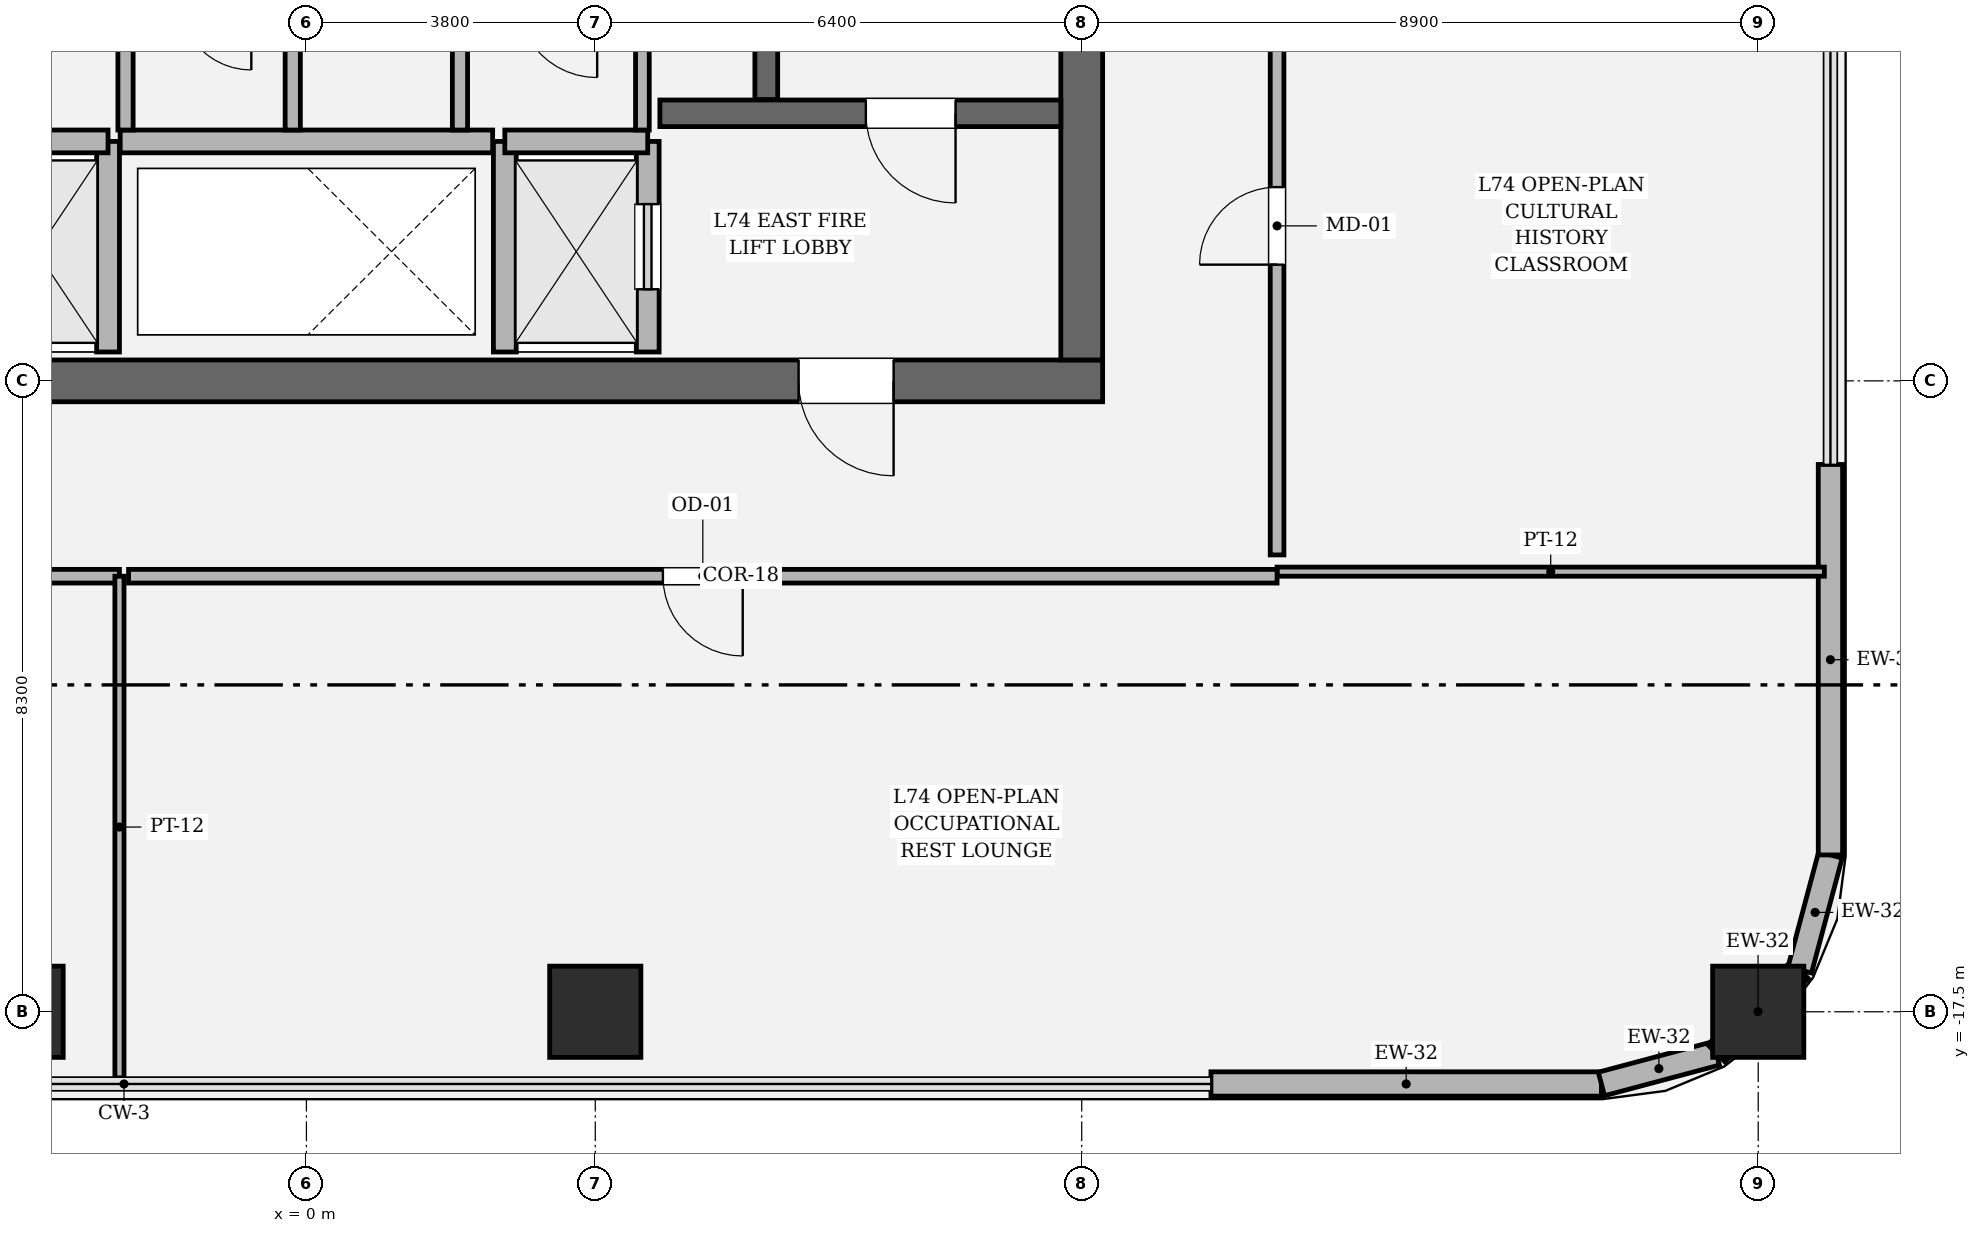
"""IFC4 building model, lengths in metres.
Left out: names, types, materials, properties, quantities, classifications, styles, units other than length and angle.
Written with IfcOpenShell. Run it as: python <this file> out.ifc"""

import sys

from ifc_helpers import new_model, si_unit, direction, frame, frame_2d, origin, origin_2d, place, context, subcontext, project, spatial, rectangle, hollow_rectangle, extrude, element, fill, save


model = new_model("IFC4")
c1 = context("Model", 3, precision=1e-05, world=origin(), true_north=direction((0.0, 1.0)))
c2 = subcontext(c1, "Body", "Model", "MODEL_VIEW")
j1 = project(units=[si_unit("LENGTHUNIT", "METRE"), si_unit("PLANEANGLEUNIT", "RADIAN")], contexts=[c1])
p1 = place(None, origin())
s1 = spatial("IfcSite", under=j1, at=p1, CompositionType="ELEMENT")
p2 = place(p1, origin())
s2 = spatial("IfcBuilding", under=s1, at=p2, CompositionType="ELEMENT")
p3 = place(p2, frame((0.0, 0.0, 313.2)))
s3 = spatial("IfcBuildingStorey", under=s2, at=p3, CompositionType="ELEMENT", Elevation=313.2)
p4 = place(p3, frame((10.475, -9.2, 0.0), z_axis=(0.0, 0.0, 1.0), x_axis=(-1.0, 0.0, 0.0)))
e1 = element("IfcWall", 1, at=p4, inside=s3, PredefinedType="SHEAR", context=c2, shape_type="SweptSolid", body=[
    extrude(rectangle(XDim=20.95, YDim=0.55, at=frame_2d((10.475, 0.0))), origin(), (0.0, 0.0, 1.0), 4.2),
])
p5 = place(p4, frame((2.75, 0.0, 0.0)))
e2 = element("IfcOpeningElement", 2, at=p5, cuts=e1, PredefinedType="OPENING", context=c2, shape_type="SweptSolid", body=[
    extrude(rectangle(XDim=1.25, YDim=2.25, at=frame_2d((0.625, 1.125))), frame((0.0, 0.285, 0.0), z_axis=(0.0, -1.0, 0.0), x_axis=(1.0, 0.0, 0.0)), (0.0, 0.0, 1.0), 0.57),
])
p6 = place(p4, frame((16.95, 0.0, 0.0)))
e3 = element("IfcOpeningElement", 3, at=p6, cuts=e1, PredefinedType="OPENING", context=c2, shape_type="SweptSolid", body=[
    extrude(rectangle(XDim=1.25, YDim=2.25, at=frame_2d((0.625, 1.125))), frame((0.0, 0.285, 0.0), z_axis=(0.0, -1.0, 0.0), x_axis=(1.0, 0.0, 0.0)), (0.0, 0.0, 1.0), 0.57),
])
p7 = place(p3, frame((10.2, 8.925, 0.0), z_axis=(0.0, 0.0, 1.0), x_axis=(0.0, -1.0, 0.0)))
e4 = element("IfcWall", 4, at=p7, inside=s3, PredefinedType="SHEAR", context=c2, shape_type="SweptSolid", body=[
    extrude(rectangle(XDim=17.85, YDim=0.55, at=frame_2d((8.925, 0.0))), origin(), (0.0, 0.0, 1.0), 4.2),
])
p8 = place(p7, frame((3.955, 0.0, 0.0)))
e5 = element("IfcOpeningElement", 5, at=p8, cuts=e4, PredefinedType="OPENING", context=c2, shape_type="SweptSolid", body=[
    extrude(rectangle(XDim=1.18, YDim=2.2, at=frame_2d((0.59, 1.1))), frame((0.0, 0.285, 0.0), z_axis=(0.0, -1.0, 0.0), x_axis=(1.0, 0.0, 0.0)), (0.0, 0.0, 1.0), 0.57),
])
p9 = place(p3, frame((6.05, 3.45, 0.0), z_axis=(0.0, 0.0, 1.0), x_axis=(0.0, -1.0, 0.0)))
e6 = element("IfcWall", 6, at=p9, inside=s3, PredefinedType="SOLIDWALL", context=c2, shape_type="SweptSolid", body=[
    extrude(rectangle(XDim=8.95, YDim=0.3, at=frame_2d((4.475, 0.0))), origin(), (0.0, 0.0, 1.0), 4.2),
])
p10 = place(p3, frame((4.65, -5.68, 0.0), z_axis=(0.0, 0.0, 1.0), x_axis=(1.0, 0.0, 0.0)))
e7 = element("IfcWall", 7, at=p10, inside=s3, PredefinedType="SOLIDWALL", context=c2, shape_type="SweptSolid", body=[
    extrude(rectangle(XDim=5.275, YDim=0.35, at=frame_2d((2.638, 0.0))), origin(), (0.0, 0.0, 1.0), 4.2),
])
p11 = place(p10, frame((2.71, 0.0, 0.0)))
e8 = element("IfcOpeningElement", 8, at=p11, cuts=e7, PredefinedType="OPENING", context=c2, shape_type="SweptSolid", body=[
    extrude(rectangle(XDim=1.18, YDim=2.2, at=frame_2d((0.59, 1.1))), frame((0.0, 0.185, 0.0), z_axis=(0.0, -1.0, 0.0), x_axis=(1.0, 0.0, 0.0)), (0.0, 0.0, 1.0), 0.37),
])
for number, where, z_axis, x_axis in (
    (9, (-3.8, -17.5, 0.0), (0.0, 0.0, 1.0), (1.0, 0.0, 0.0)),
    (10, (3.8, -17.5, 0.0), (0.0, 0.0, 1.0), (1.0, 0.0, 0.0)),
    (11, (19.1, -17.5, 0.0), (0.0, 0.0, 1.0), (1.0, 0.0, 0.0)),
):
    element("IfcColumn", number, at=place(p3, frame(where, z_axis=z_axis, x_axis=x_axis)), inside=s3, PredefinedType="COLUMN", context=c2, shape_type="SweptSolid", body=[
        extrude(hollow_rectangle(XDim=1.2, YDim=1.2, WallThickness=0.035, at=origin_2d()), origin(), (0.0, 0.0, 1.0), 4.2),
    ])
p12 = place(p3, frame((11.9, -18.45, 0.0), z_axis=(0.0, 0.0, 1.0), x_axis=(1.0, 0.0, 0.0)))
e12 = element("IfcWall", 12, at=p12, inside=s3, PredefinedType="SOLIDWALL", context=c2, shape_type="SweptSolid", body=[
    extrude(rectangle(XDim=5.137, YDim=0.32, at=frame_2d((2.568, 0.0))), origin(), (0.0, 0.0, 1.0), 3.92),
])
p13 = place(p3, frame((17.037, -18.45, 0.0), z_axis=(0.0, 0.0, 1.0), x_axis=(0.966224582397, 0.257701486942, 0.0)))
e13 = element("IfcWall", 13, at=p13, inside=s3, PredefinedType="SOLIDWALL", context=c2, shape_type="SweptSolid", body=[
    extrude(rectangle(XDim=1.565, YDim=0.32, at=frame_2d((0.783, 0.0))), origin(), (0.0, 0.0, 1.0), 3.92),
])
p14 = place(p3, frame((18.549, -18.047, 0.0), z_axis=(0.0, 0.0, 1.0), x_axis=(0.707106781187, 0.707106781187, 0.0)))
e14 = element("IfcWall", 14, at=p14, inside=s3, PredefinedType="SOLIDWALL", context=c2, shape_type="SweptSolid", body=[
    extrude(rectangle(XDim=1.552, YDim=0.32, at=frame_2d((0.776, 0.0))), origin(), (0.0, 0.0, 1.0), 2.594),
])
p15 = place(p3, frame((19.646, -16.949, 0.0), z_axis=(0.0, 0.0, 1.0), x_axis=(0.257847112249, 0.966185730957, 0.0)))
e15 = element("IfcWall", 15, at=p15, inside=s3, PredefinedType="SOLIDWALL", context=c2, shape_type="SweptSolid", body=[
    extrude(rectangle(XDim=1.565, YDim=0.32, at=frame_2d((0.783, 0.0))), origin(), (0.0, 0.0, 1.0), 3.92),
])
p16 = place(p3, frame((20.05, -15.437, 0.0), z_axis=(0.0, 0.0, 1.0), x_axis=(0.0, 1.0, 0.0)))
e16 = element("IfcWall", 16, at=p16, inside=s3, PredefinedType="SOLIDWALL", context=c2, shape_type="SweptSolid", body=[
    extrude(rectangle(XDim=5.137, YDim=0.32, at=frame_2d((2.568, 0.0))), origin(), (0.0, 0.0, 1.0), 3.92),
])
p17 = place(p3, frame((-2.61, -8.82, 0.0), z_axis=(0.0, 0.0, 1.0), x_axis=(0.0, 1.0, 0.0)))
e17 = element("IfcWall", 17, at=p17, inside=s3, PredefinedType="SOLIDWALL", context=c2, shape_type="SweptSolid", body=[
    extrude(rectangle(XDim=2.77, YDim=0.3, at=frame_2d((1.385, 0.0))), origin(), (0.0, 0.0, 1.0), 3.92),
])
p18 = place(p3, frame((-4.49, -6.05, 0.0), z_axis=(0.0, 0.0, 1.0), x_axis=(1.0, 0.0, 0.0)))
e18 = element("IfcWall", 18, at=p18, inside=s3, PredefinedType="SOLIDWALL", context=c2, shape_type="SweptSolid", body=[
    extrude(rectangle(XDim=1.88, YDim=0.3, at=frame_2d((0.94, 0.0))), origin(), (0.0, 0.0, 1.0), 3.92),
])
p19 = place(p3, frame((4.49, -8.82, 0.0), z_axis=(0.0, 0.0, 1.0), x_axis=(0.0, 1.0, 0.0)))
e19 = element("IfcWall", 19, at=p19, inside=s3, PredefinedType="SOLIDWALL", context=c2, shape_type="SweptSolid", body=[
    extrude(rectangle(XDim=2.77, YDim=0.3, at=frame_2d((1.385, 0.0))), origin(), (0.0, 0.0, 1.0), 3.92),
])
p20 = place(p19, frame((0.825, 0.0, 0.0)))
e20 = element("IfcOpeningElement", 20, at=p20, cuts=e19, PredefinedType="OPENING", context=c2, shape_type="SweptSolid", body=[
    extrude(rectangle(XDim=1.12, YDim=2.25, at=frame_2d((0.56, 1.125))), frame((0.0, 0.16, 0.0), z_axis=(0.0, -1.0, 0.0), x_axis=(1.0, 0.0, 0.0)), (0.0, 0.0, 1.0), 0.32),
])
p21 = place(p3, frame((2.61, -8.82, 0.0), z_axis=(0.0, 0.0, 1.0), x_axis=(0.0, 1.0, 0.0)))
e21 = element("IfcWall", 21, at=p21, inside=s3, PredefinedType="SOLIDWALL", context=c2, shape_type="SweptSolid", body=[
    extrude(rectangle(XDim=2.77, YDim=0.3, at=frame_2d((1.385, 0.0))), origin(), (0.0, 0.0, 1.0), 3.92),
])
p22 = place(p3, frame((2.61, -6.05, 0.0), z_axis=(0.0, 0.0, 1.0), x_axis=(1.0, 0.0, 0.0)))
e22 = element("IfcWall", 22, at=p22, inside=s3, PredefinedType="SOLIDWALL", context=c2, shape_type="SweptSolid", body=[
    extrude(rectangle(XDim=1.88, YDim=0.3, at=frame_2d((0.94, 0.0))), origin(), (0.0, 0.0, 1.0), 3.92),
])
p23 = place(p3, frame((-2.45, -6.05, 0.0), z_axis=(0.0, 0.0, 1.0), x_axis=(1.0, 0.0, 0.0)))
e23 = element("IfcWall", 23, at=p23, inside=s3, PredefinedType="SOLIDWALL", context=c2, shape_type="SweptSolid", body=[
    extrude(rectangle(XDim=4.9, YDim=0.3, at=frame_2d((2.45, 0.0))), origin(), (0.0, 0.0, 1.0), 3.92),
])
for number, where, z_axis, x_axis in (
    (24, (-2.38, -5.9, 0.0), (0.0, 0.0, 1.0), (0.0, 1.0, 0.0)),
    (25, (-0.18, -5.9, 0.0), (0.0, 0.0, 1.0), (0.0, 1.0, 0.0)),
    (26, (2.02, -5.9, 0.0), (0.0, 0.0, 1.0), (0.0, 1.0, 0.0)),
):
    element("IfcWall", number, at=place(p3, frame(where, z_axis=z_axis, x_axis=x_axis)), inside=s3, PredefinedType="SOLIDWALL", context=c2, shape_type="SweptSolid", body=[
        extrude(rectangle(XDim=1.74, YDim=0.2, at=frame_2d((0.87, 0.0))), origin(), (0.0, 0.0, 1.0), 3.92),
    ])
p24 = place(p3, frame((4.42, -5.9, 0.0), z_axis=(0.0, 0.0, 1.0), x_axis=(0.0, 1.0, 0.0)))
e27 = element("IfcWall", 27, at=p24, inside=s3, PredefinedType="PARTITIONING", context=c2, shape_type="SweptSolid", body=[
    extrude(rectangle(XDim=1.74, YDim=0.18, at=frame_2d((0.87, 0.0))), origin(), (0.0, 0.0, 1.0), 3.92),
])
p25 = place(p3, frame((-12.77, -11.77, 0.0), z_axis=(0.0, 0.0, 1.0), x_axis=(1.0, 0.0, 0.0)))
e28 = element("IfcWall", 28, at=p25, inside=s3, PredefinedType="PARTITIONING", context=c2, shape_type="SweptSolid", body=[
    extrude(rectangle(XDim=10.31, YDim=0.18, at=frame_2d((5.155, 0.0))), origin(), (0.0, 0.0, 1.0), 2.594),
])
p26 = place(p25, frame((4.63, 0.0, 0.0)))
e29 = element("IfcOpeningElement", 29, at=p26, cuts=e28, PredefinedType="OPENING", context=c2, shape_type="SweptSolid", body=[
    extrude(rectangle(XDim=1.05, YDim=2.2, at=frame_2d((0.525, 1.1))), frame((0.0, 0.1, 0.0), z_axis=(0.0, -1.0, 0.0), x_axis=(1.0, 0.0, 0.0)), (0.0, 0.0, 1.0), 0.2),
])
p27 = place(p3, frame((-2.46, -11.77, 0.0), z_axis=(0.0, 0.0, 1.0), x_axis=(0.0, -1.0, 0.0)))
e30 = element("IfcWall", 30, at=p27, inside=s3, PredefinedType="PARTITIONING", context=c2, shape_type="SweptSolid", body=[
    extrude(rectangle(XDim=6.6, YDim=0.12, at=frame_2d((3.3, 0.0))), origin(), (0.0, 0.0, 1.0), 2.594),
])
p28 = place(p3, frame((12.77, -11.71, 0.0), z_axis=(0.0, 0.0, 1.0), x_axis=(1.0, 0.0, 0.0)))
e31 = element("IfcWall", 31, at=p28, inside=s3, PredefinedType="PARTITIONING", context=c2, shape_type="SweptSolid", body=[
    extrude(rectangle(XDim=7.2, YDim=0.12, at=frame_2d((3.6, 0.0))), origin(), (0.0, 0.0, 1.0), 2.594),
])
p29 = place(p3, frame((-2.34, -11.77, 0.0), z_axis=(0.0, 0.0, 1.0), x_axis=(1.0, 0.0, 0.0)))
e32 = element("IfcWall", 32, at=p29, inside=s3, PredefinedType="PARTITIONING", context=c2, shape_type="SweptSolid", body=[
    extrude(rectangle(XDim=15.11, YDim=0.18, at=frame_2d((7.555, 0.0))), origin(), (0.0, 0.0, 1.0), 2.594),
])
p30 = place(p29, frame((7.03, 0.0, 0.0)))
e33 = element("IfcOpeningElement", 33, at=p30, cuts=e32, PredefinedType="OPENING", context=c2, shape_type="SweptSolid", body=[
    extrude(rectangle(XDim=1.05, YDim=2.2, at=frame_2d((0.525, 1.1))), frame((0.0, 0.1, 0.0), z_axis=(0.0, -1.0, 0.0), x_axis=(1.0, 0.0, 0.0)), (0.0, 0.0, 1.0), 0.2),
])
p31 = place(p3, frame((12.77, -11.49, 0.0), z_axis=(0.0, 0.0, 1.0), x_axis=(0.0, 1.0, 0.0)))
e34 = element("IfcWall", 34, at=p31, inside=s3, PredefinedType="PARTITIONING", context=c2, shape_type="SweptSolid", body=[
    extrude(rectangle(XDim=8.658, YDim=0.18, at=frame_2d((4.329, 0.0))), origin(), (0.0, 0.0, 1.0), 2.594),
])
p32 = place(p31, frame((3.819, 0.0, 0.0)))
e35 = element("IfcOpeningElement", 35, at=p32, cuts=e34, PredefinedType="OPENING", context=c2, shape_type="SweptSolid", body=[
    extrude(rectangle(XDim=1.02, YDim=2.2, at=frame_2d((0.51, 1.1))), frame((0.0, 0.1, 0.0), z_axis=(0.0, -1.0, 0.0), x_axis=(1.0, 0.0, 0.0)), (0.0, 0.0, 1.0), 0.2),
])
p33 = place(p11, origin())
e36 = element("IfcDoor", 36, at=p33, inside=s3, OperationType="SINGLE_SWING_RIGHT", PredefinedType="DOOR", context=c2, shape_type="SweptSolid", body=[
    extrude(rectangle(XDim=1.18, YDim=2.2, at=frame_2d((0.59, 1.1))), frame((0.0, 0.025, 0.0), z_axis=(0.0, -1.0, 0.0), x_axis=(1.0, 0.0, 0.0)), (0.0, 0.0, 1.0), 0.05),
])
fill(e8, e36)
p34 = place(p5, origin())
e37 = element("IfcDoor", 37, at=p34, inside=s3, OperationType="SINGLE_SWING_LEFT", PredefinedType="DOOR", context=c2, shape_type="SweptSolid", body=[
    extrude(rectangle(XDim=1.25, YDim=2.25, at=frame_2d((0.625, 1.125))), frame((0.0, 0.025, 0.0), z_axis=(0.0, -1.0, 0.0), x_axis=(1.0, 0.0, 0.0)), (0.0, 0.0, 1.0), 0.05),
])
fill(e2, e37)
p35 = place(p20, origin())
e38 = element("IfcDoor", 38, at=p35, inside=s3, OperationType="SLIDING_TO_RIGHT", PredefinedType="DOOR", context=c2, shape_type="SweptSolid", body=[
    extrude(rectangle(XDim=1.12, YDim=2.25, at=frame_2d((0.56, 1.125))), frame((0.0, 0.025, 0.0), z_axis=(0.0, -1.0, 0.0), x_axis=(1.0, 0.0, 0.0)), (0.0, 0.0, 1.0), 0.05),
])
fill(e20, e38)
p36 = place(p30, origin())
e39 = element("IfcDoor", 39, at=p36, inside=s3, OperationType="SINGLE_SWING_RIGHT", PredefinedType="DOOR", context=c2, shape_type="SweptSolid", body=[
    extrude(rectangle(XDim=1.05, YDim=2.2, at=frame_2d((0.525, 1.1))), frame((0.0, 0.025, 0.0), z_axis=(0.0, -1.0, 0.0), x_axis=(1.0, 0.0, 0.0)), (0.0, 0.0, 1.0), 0.05),
])
fill(e33, e39)
p37 = place(p32, origin())
e40 = element("IfcDoor", 40, at=p37, inside=s3, OperationType="SINGLE_SWING_LEFT", PredefinedType="DOOR", context=c2, shape_type="SweptSolid", body=[
    extrude(rectangle(XDim=1.02, YDim=2.2, at=frame_2d((0.51, 1.1))), frame((0.0, 0.025, 0.0), z_axis=(0.0, -1.0, 0.0), x_axis=(1.0, 0.0, 0.0)), (0.0, 0.0, 1.0), 0.05),
])
fill(e35, e40)
save(model, sys.argv[1])
